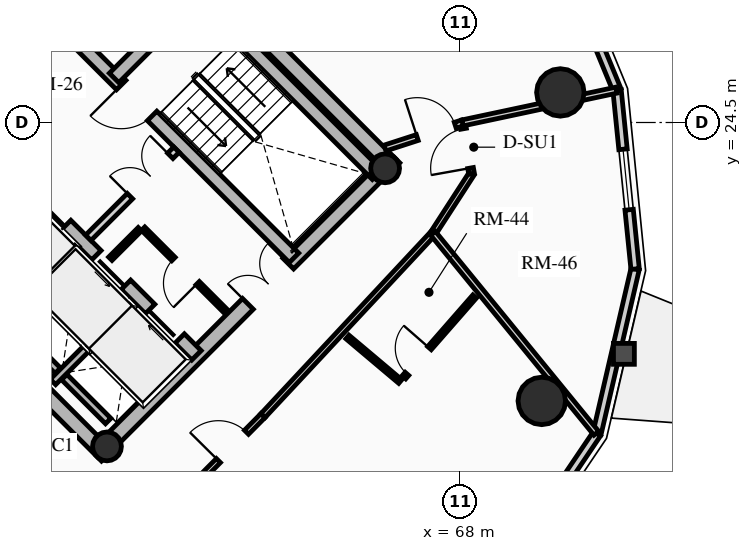
"""IFC4 building model, lengths in metres.
Left out: names, types, materials, properties, quantities, classifications, styles, units other than length and angle.
Written with IfcOpenShell. Run it as: python <this file> out.ifc"""

import sys

from ifc_helpers import new_model, si_unit, direction, frame, frame_2d, origin, origin_2d, place, context, subcontext, project, spatial, rectangle, circle, hollow_circle, extrude, source, transform, mapped, element, fill, save


model = new_model("IFC4")
c1 = context("Model", 3, precision=1e-05, world=origin(), true_north=direction((0.0, 1.0)))
c2 = subcontext(c1, "Body", "Model", "MODEL_VIEW")
j1 = project(units=[si_unit("LENGTHUNIT", "METRE"), si_unit("PLANEANGLEUNIT", "RADIAN")], contexts=[c1])
p1 = place(None, origin())
s1 = spatial("IfcSite", under=j1, at=p1, CompositionType="ELEMENT")
p2 = place(p1, origin())
s2 = spatial("IfcBuilding", under=s1, at=p2, CompositionType="ELEMENT")
p3 = place(p2, frame((0.0, 0.0, 180.7)))
s3 = spatial("IfcBuildingStorey", under=s2, at=p3, CompositionType="ELEMENT", Elevation=180.7)
for number, where, z_axis, x_axis in (
    (1, (58.702, 15.732, 0.0), (0.0, 0.0, 1.0), (-0.707, 0.707, 0.0)),
    (2, (66.268, 23.298, 0.0), (0.0, 0.0, 1.0), (-0.707, 0.707, 0.0)),
):
    element("IfcWall", number, at=place(p3, frame(where, z_axis=z_axis, x_axis=x_axis)), inside=s3, PredefinedType="SHEAR", context=c2, shape_type="SweptSolid", body=[
        extrude(rectangle(XDim=14.1, YDim=0.4, at=frame_2d((7.05, 0.0))), origin(), (0.0, 0.0, 1.0), 2.91),
    ])
p4 = place(p3, frame((58.561, 15.873, 0.0), z_axis=(0.0, 0.0, 1.0), x_axis=(0.707106781187, 0.707106781187, 0.0)))
e3 = element("IfcWall", 3, at=p4, inside=s3, PredefinedType="SHEAR", context=c2, shape_type="SweptSolid", body=[
    extrude(rectangle(XDim=10.7, YDim=0.4, at=frame_2d((5.35, 0.0))), origin(), (0.0, 0.0, 1.0), 2.91),
])
m1 = source(origin(), c2, "Body", "SweptSolid", [
    extrude(rectangle(XDim=1.5, YDim=2.02, at=frame_2d((0.75, 1.01))), frame((0.0, 0.21, 0.0), z_axis=(0.0, -1.0, 0.0), x_axis=(1.0, 0.0, 0.0)), (0.0, 0.0, 1.0), 0.42),
])
p5 = place(p4, frame((5.45, 0.0, 0.0)))
e4 = element("IfcOpeningElement", 4, at=p5, cuts=e3, PredefinedType="OPENING", context=c2, shape_type="MappedRepresentation", body=[
    mapped(m1, transform((0.0, 0.0, 0.0), x_axis=(1.0, 0.0, 0.0), y_axis=(0.0, 1.0, 0.0), z_axis=(0.0, 0.0, 1.0), scale=1.0)),
])
p6 = place(p3, frame((61.06, 18.373, 0.0), z_axis=(0.0, 0.0, 1.0), x_axis=(-0.707106781187, 0.707106781187, 0.0)))
e5 = element("IfcWall", 5, at=p6, inside=s3, PredefinedType="SHEAR", context=c2, shape_type="SweptSolid", body=[
    extrude(rectangle(XDim=13.7, YDim=0.35, at=frame_2d((6.85, 0.0))), origin(), (0.0, 0.0, 1.0), 2.91),
])
m2 = source(origin(), c2, "Body", "SweptSolid", [
    extrude(rectangle(XDim=1.1, YDim=2.015, at=frame_2d((0.55, 1.007))), frame((0.0, 0.185, 0.0), z_axis=(0.0, -1.0, 0.0), x_axis=(1.0, 0.0, 0.0)), (0.0, 0.0, 1.0), 0.37),
])
p7 = place(p6, frame((4.85, 0.0, 0.0)))
e6 = element("IfcOpeningElement", 6, at=p7, cuts=e5, PredefinedType="OPENING", context=c2, shape_type="MappedRepresentation", body=[
    mapped(m2, transform((0.0, 0.0, 0.0), x_axis=(1.0, 0.0, 0.0), y_axis=(0.0, 1.0, 0.0), z_axis=(0.0, 0.0, 1.0), scale=1.0)),
])
p8 = place(p6, frame((0.625, 0.0, 0.0)))
e7 = element("IfcOpeningElement", 7, at=p8, cuts=e5, PredefinedType="OPENING", context=c2, shape_type="MappedRepresentation", body=[
    mapped(m2, transform((0.0, 0.0, 0.0), x_axis=(1.0, 0.0, 0.0), y_axis=(0.0, 1.0, 0.0), z_axis=(0.0, 0.0, 1.0), scale=1.0)),
])
p9 = place(p6, frame((2.625, 0.0, 0.0)))
e8 = element("IfcOpeningElement", 8, at=p9, cuts=e5, PredefinedType="OPENING", context=c2, shape_type="MappedRepresentation", body=[
    mapped(m2, transform((0.0, 0.0, 0.0), x_axis=(1.0, 0.0, 0.0), y_axis=(0.0, 1.0, 0.0), z_axis=(0.0, 0.0, 1.0), scale=1.0)),
])
m3 = source(origin(), c2, "Body", "SweptSolid", [
    extrude(rectangle(XDim=1.15, YDim=2.02, at=frame_2d((0.575, 1.01))), frame((0.0, 0.185, 0.0), z_axis=(0.0, -1.0, 0.0), x_axis=(1.0, 0.0, 0.0)), (0.0, 0.0, 1.0), 0.37),
])
p10 = place(p6, frame((7.27, 0.0, 0.0)))
e9 = element("IfcOpeningElement", 9, at=p10, cuts=e5, PredefinedType="OPENING", context=c2, shape_type="MappedRepresentation", body=[
    mapped(m3, transform((0.0, 0.0, 0.0), x_axis=(1.0, 0.0, 0.0), y_axis=(0.0, 1.0, 0.0), z_axis=(0.0, 0.0, 1.0), scale=1.0)),
])
p11 = place(p3, frame((63.627, 20.94, 0.0), z_axis=(0.0, 0.0, 1.0), x_axis=(-0.707119496762, 0.707094065383, 0.0)))
e10 = element("IfcWall", 10, at=p11, inside=s3, PredefinedType="SHEAR", context=c2, shape_type="SweptSolid", body=[
    extrude(rectangle(XDim=9.6, YDim=0.35, at=frame_2d((4.8, 0.0))), origin(), (0.0, 0.0, 1.0), 2.91),
])
p12 = place(p11, frame((5.28, 0.0, 0.0)))
e11 = element("IfcOpeningElement", 11, at=p12, cuts=e10, PredefinedType="OPENING", context=c2, shape_type="MappedRepresentation", body=[
    mapped(m3, transform((0.0, 0.0, 0.0), x_axis=(1.0, 0.0, 0.0), y_axis=(0.0, 1.0, 0.0), z_axis=(0.0, 0.0, 1.0), scale=1.0)),
])
p13 = place(p3, frame((65.812, 23.125, 0.0), z_axis=(0.0, 0.0, 1.0), x_axis=(-0.707106781187, 0.707106781187, 0.0)))
e12 = element("IfcWall", 12, at=p13, inside=s3, PredefinedType="SHEAR", context=c2, shape_type="SweptSolid", body=[
    extrude(rectangle(XDim=6.695, YDim=0.35, at=frame_2d((3.348, 0.0))), origin(), (0.0, 0.0, 1.0), 2.91),
])
p14 = place(p3, frame((58.893, 25.674, 0.0), z_axis=(0.0, 0.0, 1.0), x_axis=(0.707106781187, 0.707106781187, 0.0)))
e13 = element("IfcWall", 13, at=p14, inside=s3, PredefinedType="SHEAR", context=c2, shape_type="SweptSolid", body=[
    extrude(rectangle(XDim=3.285, YDim=0.35, at=frame_2d((1.643, 0.0))), origin(), (0.0, 0.0, 1.0), 2.91),
])
for number, where, z_axis, x_axis in (
    (14, (58.706, 15.976, 0.0), (0.0, 0.0, 1.0), (0.707, 0.707, 0.0)),
    (15, (66.024, 23.294, 0.0), (0.0, 0.0, 1.0), (0.707, 0.707, 0.0)),
):
    element("IfcColumn", number, at=place(p3, frame(where, z_axis=z_axis, x_axis=x_axis)), inside=s3, PredefinedType="COLUMN", context=c2, shape_type="SweptSolid", body=[
        extrude(hollow_circle(Radius=0.38, WallThickness=0.032, at=origin_2d()), origin(), (0.0, 0.0, 1.0), 2.91),
    ])
for number, where, z_axis, x_axis in (
    (16, (70.146, 17.173, 0.0), (0.0, 0.0, 1.0), (1.0, 0.0, 0.0)),
    (17, (70.635, 25.291, 0.0), (0.0, 0.0, 1.0), (1.0, 0.0, 0.0)),
):
    element("IfcColumn", number, at=place(p3, frame(where, z_axis=z_axis, x_axis=x_axis)), inside=s3, PredefinedType="USERDEFINED", context=c2, shape_type="SweptSolid", body=[
        extrude(circle(Radius=0.625, at=origin_2d()), origin(), (0.0, 0.0, 1.0), 2.91),
    ])
p15 = place(p3, frame((71.6, 16.313, 0.0), z_axis=(0.0, 0.0, 1.0), x_axis=(-0.55951912514, -0.828817439852, 0.0)))
e18 = element("IfcWall", 18, at=p15, inside=s3, PredefinedType="SOLIDWALL", context=c2, shape_type="SweptSolid", body=[
    extrude(rectangle(XDim=4.259, YDim=0.22, at=frame_2d((2.129, 0.0))), origin(), (0.0, 0.0, 1.0), 2.245),
])
m4 = source(origin(), c2, "Body", "SweptSolid", [
    extrude(rectangle(XDim=1.6, YDim=1.3, at=frame_2d((0.8, 0.65))), frame((0.0, 0.12, 0.0), z_axis=(0.0, -1.0, 0.0), x_axis=(1.0, 0.0, 0.0)), (0.0, 0.0, 1.0), 0.24),
])
p16 = place(p15, frame((1.33, 0.0, 0.65)))
e19 = element("IfcOpeningElement", 19, at=p16, cuts=e18, PredefinedType="OPENING", context=c2, shape_type="MappedRepresentation", body=[
    mapped(m4, transform((0.0, 0.0, 0.0), x_axis=(1.0, 0.0, 0.0), y_axis=(0.0, 1.0, 0.0), z_axis=(0.0, 0.0, 1.0), scale=1.0)),
])
p17 = place(p3, frame((72.603, 20.645, 0.0), z_axis=(0.0, 0.0, 1.0), x_axis=(-0.22557328587, -0.97422620202, 0.0)))
e20 = element("IfcWall", 20, at=p17, inside=s3, PredefinedType="SOLIDWALL", context=c2, shape_type="SweptSolid", body=[
    extrude(rectangle(XDim=4.446, YDim=0.22, at=frame_2d((2.223, 0.0))), origin(), (0.0, 0.0, 1.0), 2.245),
])
p18 = place(p3, frame((72.127, 25.354, 0.0), z_axis=(0.0, 0.0, 1.0), x_axis=(0.100438356004, -0.994943283129, 0.0)))
e21 = element("IfcWall", 21, at=p18, inside=s3, PredefinedType="SOLIDWALL", context=c2, shape_type="SweptSolid", body=[
    extrude(rectangle(XDim=4.733, YDim=0.22, at=frame_2d((2.366, 0.0))), origin(), (0.0, 0.0, 1.0), 2.245),
])
p19 = place(p18, frame((1.566, 0.0, 0.65)))
e22 = element("IfcOpeningElement", 22, at=p19, cuts=e21, PredefinedType="OPENING", context=c2, shape_type="MappedRepresentation", body=[
    mapped(m4, transform((0.0, 0.0, 0.0), x_axis=(1.0, 0.0, 0.0), y_axis=(0.0, 1.0, 0.0), z_axis=(0.0, 0.0, 1.0), scale=1.0)),
])
p20 = place(p3, frame((70.22, 29.979, 0.0), z_axis=(0.0, 0.0, 1.0), x_axis=(0.381196434348, -0.924494066201, 0.0)))
e23 = element("IfcWall", 23, at=p20, inside=s3, PredefinedType="SOLIDWALL", context=c2, shape_type="SweptSolid", body=[
    extrude(rectangle(XDim=5.003, YDim=0.22, at=frame_2d((2.501, 0.0))), origin(), (0.0, 0.0, 1.0), 2.245),
])
p21 = place(p3, frame((55.888, 19.069, 0.0), z_axis=(0.0, 0.0, 1.0), x_axis=(0.707106781187, 0.707106781187, 0.0)))
e24 = element("IfcWall", 24, at=p21, inside=s3, PredefinedType="SHEAR", context=c2, shape_type="SweptSolid", body=[
    extrude(rectangle(XDim=2.97, YDim=0.2, at=frame_2d((1.485, 0.0))), origin(), (0.0, 0.0, 1.0), 2.91),
])
p22 = place(p3, frame((57.284, 17.673, 0.0), z_axis=(0.0, 0.0, 1.0), x_axis=(0.707147878904, 0.70706568108, 0.0)))
e25 = element("IfcWall", 25, at=p22, inside=s3, PredefinedType="SHEAR", context=c2, shape_type="SweptSolid", body=[
    extrude(rectangle(XDim=2.97, YDim=0.2, at=frame_2d((1.485, 0.0))), origin(), (0.0, 0.0, 1.0), 2.91),
])
p23 = place(p3, frame((57.412, 17.97, 0.0), z_axis=(0.0, 0.0, 1.0), x_axis=(-0.707106781187, 0.707106781187, 0.0)))
e26 = element("IfcWall", 26, at=p23, inside=s3, PredefinedType="SHEAR", context=c2, shape_type="SweptSolid", body=[
    extrude(rectangle(XDim=1.735, YDim=0.2, at=frame_2d((0.867, 0.0))), origin(), (0.0, 0.0, 1.0), 2.91),
])
p24 = place(p3, frame((58.737, 16.644, 0.0), z_axis=(0.0, 0.0, 1.0), x_axis=(-0.707032117043, 0.707181437447, 0.0)))
e27 = element("IfcWall", 27, at=p24, inside=s3, PredefinedType="SHEAR", context=c2, shape_type="SweptSolid", body=[
    extrude(rectangle(XDim=1.635, YDim=0.2, at=frame_2d((0.817, 0.0))), origin(), (0.0, 0.0, 1.0), 2.91),
])
p25 = place(p3, frame((58.214, 21.467, 0.0), z_axis=(0.0, 0.0, 1.0), x_axis=(0.707106781187, 0.707106781187, 0.0)))
e28 = element("IfcWall", 28, at=p25, inside=s3, PredefinedType="PARTITIONING", context=c2, shape_type="SweptSolid", body=[
    extrude(rectangle(XDim=3.28, YDim=0.2, at=frame_2d((1.64, 0.0))), origin(), (0.0, 0.0, 1.0), 2.675),
])
m5 = source(origin(), c2, "Body", "SweptSolid", [
    extrude(rectangle(XDim=1.5, YDim=2.02, at=frame_2d((0.75, 1.01))), frame((0.0, 0.11, 0.0), z_axis=(0.0, -1.0, 0.0), x_axis=(1.0, 0.0, 0.0)), (0.0, 0.0, 1.0), 0.22),
])
p26 = place(p25, frame((1.55, 0.0, 0.0)))
e29 = element("IfcOpeningElement", 29, at=p26, cuts=e28, PredefinedType="OPENING", context=c2, shape_type="MappedRepresentation", body=[
    mapped(m5, transform((0.0, 0.0, 0.0), x_axis=(1.0, 0.0, 0.0), y_axis=(0.0, 1.0, 0.0), z_axis=(0.0, 0.0, 1.0), scale=1.0)),
])
p27 = place(p3, frame((54.961, 24.719, 0.0), z_axis=(0.0, 0.0, 1.0), x_axis=(0.707106781187, 0.707106781187, 0.0)))
e30 = element("IfcWall", 30, at=p27, inside=s3, PredefinedType="PARTITIONING", context=c2, shape_type="SweptSolid", body=[
    extrude(rectangle(XDim=3.28, YDim=0.2, at=frame_2d((1.64, 0.0))), origin(), (0.0, 0.0, 1.0), 2.675),
])
m6 = source(origin(), c2, "Body", "SweptSolid", [
    extrude(rectangle(XDim=0.9, YDim=2.005, at=frame_2d((0.45, 1.002))), frame((0.0, 0.11, 0.0), z_axis=(0.0, -1.0, 0.0), x_axis=(1.0, 0.0, 0.0)), (0.0, 0.0, 1.0), 0.22),
])
p28 = place(p27, frame((0.16, 0.0, 0.0)))
e31 = element("IfcOpeningElement", 31, at=p28, cuts=e30, PredefinedType="OPENING", context=c2, shape_type="MappedRepresentation", body=[
    mapped(m6, transform((0.0, 0.0, 0.0), x_axis=(1.0, 0.0, 0.0), y_axis=(0.0, 1.0, 0.0), z_axis=(0.0, 0.0, 1.0), scale=1.0)),
])
p29 = place(p3, frame((61.835, 19.529, 0.0), z_axis=(0.0, 0.0, 1.0), x_axis=(-0.707146413884, 0.707067146267, 0.0)))
e32 = element("IfcWall", 32, at=p29, inside=s3, PredefinedType="PARTITIONING", context=c2, shape_type="SweptSolid", body=[
    extrude(rectangle(XDim=3.08, YDim=0.125, at=frame_2d((1.54, 0.0))), origin(), (0.0, 0.0, 1.0), 2.675),
])
m7 = source(origin(), c2, "Body", "SweptSolid", [
    extrude(rectangle(XDim=0.9, YDim=2.005, at=frame_2d((0.45, 1.002))), frame((0.0, 0.073, 0.0), z_axis=(0.0, -1.0, 0.0), x_axis=(1.0, 0.0, 0.0)), (0.0, 0.0, 1.0), 0.145),
])
p30 = place(p29, frame((1.05, 0.0, 0.0)))
e33 = element("IfcOpeningElement", 33, at=p30, cuts=e32, PredefinedType="OPENING", context=c2, shape_type="MappedRepresentation", body=[
    mapped(m7, transform((0.0, 0.0, 0.0), x_axis=(1.0, 0.0, 0.0), y_axis=(0.0, 1.0, 0.0), z_axis=(0.0, 0.0, 1.0), scale=1.0)),
])
p31 = place(p3, frame((58.794, 20.915, 0.0), z_axis=(0.0, 0.0, 1.0), x_axis=(0.707106781187, 0.707106781187, 0.0)))
e34 = element("IfcWall", 34, at=p31, inside=s3, PredefinedType="PARTITIONING", context=c2, shape_type="SweptSolid", body=[
    extrude(rectangle(XDim=1.1, YDim=0.125, at=frame_2d((0.55, 0.0))), origin(), (0.0, 0.0, 1.0), 2.675),
])
p32 = place(p3, frame((60.501, 14.457, 0.0), z_axis=(0.0, 0.0, 1.0), x_axis=(0.704012266258, 0.710187812454, 0.0)))
e35 = element("IfcWall", 35, at=p32, inside=s3, PredefinedType="PARTITIONING", context=c2, shape_type="SweptSolid", body=[
    extrude(rectangle(XDim=3.281, YDim=0.15, at=frame_2d((1.641, 0.0))), origin(), (0.0, 0.0, 1.0), 2.245),
])
m8 = source(origin(), c2, "Body", "SweptSolid", [
    extrude(rectangle(XDim=1.05, YDim=2.015, at=frame_2d((0.525, 1.007))), frame((0.0, 0.085, 0.0), z_axis=(0.0, -1.0, 0.0), x_axis=(1.0, 0.0, 0.0)), (0.0, 0.0, 1.0), 0.17),
])
p33 = place(p32, frame((1.614, 0.0, 0.0)))
e36 = element("IfcOpeningElement", 36, at=p33, cuts=e35, PredefinedType="OPENING", context=c2, shape_type="MappedRepresentation", body=[
    mapped(m8, transform((0.0, 0.0, 0.0), x_axis=(1.0, 0.0, 0.0), y_axis=(0.0, 1.0, 0.0), z_axis=(0.0, 0.0, 1.0), scale=1.0)),
])
p34 = place(p3, frame((62.812, 16.788, 0.0), z_axis=(0.0, 0.0, 1.0), x_axis=(0.682323555485, 0.731050316757, 0.0)))
e37 = element("IfcWall", 37, at=p34, inside=s3, PredefinedType="PARTITIONING", context=c2, shape_type="SweptSolid", body=[
    extrude(rectangle(XDim=6.559, YDim=0.15, at=frame_2d((3.279, 0.0))), origin(), (0.0, 0.0, 1.0), 2.245),
])
p35 = place(p3, frame((67.287, 21.582, 0.0), z_axis=(0.0, 0.0, 1.0), x_axis=(0.543202443884, 0.839601753785, 0.0)))
e38 = element("IfcWall", 38, at=p35, inside=s3, PredefinedType="PARTITIONING", context=c2, shape_type="SweptSolid", body=[
    extrude(rectangle(XDim=1.866, YDim=0.15, at=frame_2d((0.933, 0.0))), origin(), (0.0, 0.0, 1.0), 2.245),
])
p36 = place(p3, frame((68.3, 23.149, 0.0), z_axis=(0.0, 0.0, 1.0), x_axis=(-0.176423554694, 0.984314344785, 0.0)))
e39 = element("IfcWall", 39, at=p36, inside=s3, PredefinedType="PARTITIONING", context=c2, shape_type="SweptSolid", body=[
    extrude(rectangle(XDim=1.362, YDim=0.15, at=frame_2d((0.681, 0.0))), origin(), (0.0, 0.0, 1.0), 2.245),
])
p37 = place(p36, frame((0.156, 0.0, 0.0)))
e40 = element("IfcOpeningElement", 40, at=p37, cuts=e39, PredefinedType="OPENING", context=c2, shape_type="MappedRepresentation", body=[
    mapped(m8, transform((0.0, 0.0, 0.0), x_axis=(1.0, 0.0, 0.0), y_axis=(0.0, 1.0, 0.0), z_axis=(0.0, 0.0, 1.0), scale=1.0)),
])
p38 = place(p3, frame((67.287, 21.582, 0.0), z_axis=(0.0, 0.0, 1.0), x_axis=(0.632528819581, -0.774536824431, 0.0)))
e41 = element("IfcWall", 41, at=p38, inside=s3, PredefinedType="PARTITIONING", context=c2, shape_type="SweptSolid", body=[
    extrude(rectangle(XDim=6.791, YDim=0.16, at=frame_2d((3.396, 0.0))), origin(), (0.0, 0.0, 1.0), 2.245),
])
p39 = place(p3, frame((68.06, 24.489, 0.0), z_axis=(0.0, 0.0, 1.0), x_axis=(0.978089830324, 0.2081832938, 0.0)))
e42 = element("IfcWall", 42, at=p39, inside=s3, PredefinedType="PARTITIONING", context=c2, shape_type="SweptSolid", body=[
    extrude(rectangle(XDim=4.138, YDim=0.16, at=frame_2d((2.069, 0.0))), origin(), (0.0, 0.0, 1.0), 2.245),
])
p40 = place(p3, frame((66.021, 23.828, 0.0), z_axis=(0.0, 0.0, 1.0), x_axis=(0.951292345965, 0.308290240695, 0.0)))
e43 = element("IfcWall", 43, at=p40, inside=s3, PredefinedType="PARTITIONING", context=c2, shape_type="SweptSolid", body=[
    extrude(rectangle(XDim=2.144, YDim=0.16, at=frame_2d((1.072, 0.0))), origin(), (0.0, 0.0, 1.0), 2.245),
])
m9 = source(origin(), c2, "Body", "SweptSolid", [
    extrude(rectangle(XDim=1.05, YDim=2.015, at=frame_2d((0.525, 1.007))), frame((0.0, 0.09, 0.0), z_axis=(0.0, -1.0, 0.0), x_axis=(1.0, 0.0, 0.0)), (0.0, 0.0, 1.0), 0.18),
])
p41 = place(p40, frame((0.894, 0.0, 0.0)))
e44 = element("IfcOpeningElement", 44, at=p41, cuts=e43, PredefinedType="OPENING", context=c2, shape_type="MappedRepresentation", body=[
    mapped(m9, transform((0.0, 0.0, 0.0), x_axis=(1.0, 0.0, 0.0), y_axis=(0.0, 1.0, 0.0), z_axis=(0.0, 0.0, 1.0), scale=1.0)),
])
p42 = place(p3, frame((65.033, 18.856, 0.0), z_axis=(0.0, 0.0, 1.0), x_axis=(0.764632588969, -0.644466449, 0.0)))
e45 = element("IfcWall", 45, at=p42, inside=s3, PredefinedType="PARTITIONING", context=c2, shape_type="SweptSolid", body=[
    extrude(rectangle(XDim=1.818, YDim=0.125, at=frame_2d((0.909, 0.0))), origin(), (0.0, 0.0, 1.0), 2.675),
])
p43 = place(p3, frame((66.52, 17.795, 0.0), z_axis=(0.0, 0.0, 1.0), x_axis=(0.658266024679, 0.752785388244, 0.0)))
e46 = element("IfcWall", 46, at=p43, inside=s3, PredefinedType="PARTITIONING", context=c2, shape_type="SweptSolid", body=[
    extrude(rectangle(XDim=2.826, YDim=0.125, at=frame_2d((1.413, 0.0))), origin(), (0.0, 0.0, 1.0), 2.245),
])
p44 = place(p43, frame((0.12, 0.0, 0.0)))
e47 = element("IfcOpeningElement", 47, at=p44, cuts=e46, PredefinedType="OPENING", context=c2, shape_type="MappedRepresentation", body=[
    mapped(m7, transform((0.0, 0.0, 0.0), x_axis=(1.0, 0.0, 0.0), y_axis=(0.0, 1.0, 0.0), z_axis=(0.0, 0.0, 1.0), scale=1.0)),
])
m10 = source(origin(), c2, "Body", "SweptSolid", [
    extrude(rectangle(XDim=1.6, YDim=1.3, at=frame_2d((0.8, 0.65))), frame((0.0, 0.03, 0.0), z_axis=(0.0, -1.0, 0.0), x_axis=(1.0, 0.0, 0.0)), (0.0, 0.0, 1.0), 0.06),
])
p45 = place(p19, origin())
e48 = element("IfcWindow", 48, at=p45, inside=s3, PartitioningType="SINGLE_PANEL", PredefinedType="WINDOW", context=c2, shape_type="MappedRepresentation", body=[
    mapped(m10, transform((0.0, 0.0, 0.0), x_axis=(1.0, 0.0, 0.0), y_axis=(0.0, 1.0, 0.0), z_axis=(0.0, 0.0, 1.0), scale=1.0)),
])
fill(e22, e48)
m11 = source(origin(), c2, "Body", "SweptSolid", [
    extrude(rectangle(XDim=1.1, YDim=2.015, at=frame_2d((0.55, 1.007))), frame((0.0, 0.025, 0.0), z_axis=(0.0, -1.0, 0.0), x_axis=(1.0, 0.0, 0.0)), (0.0, 0.0, 1.0), 0.05),
])
p46 = place(p7, origin())
e49 = element("IfcDoor", 49, at=p46, inside=s3, OperationType="SLIDING_TO_LEFT", PredefinedType="DOOR", context=c2, shape_type="MappedRepresentation", body=[
    mapped(m11, transform((0.0, 0.0, 0.0), x_axis=(1.0, 0.0, 0.0), y_axis=(0.0, 1.0, 0.0), z_axis=(0.0, 0.0, 1.0), scale=1.0)),
])
fill(e6, e49)
p47 = place(p8, origin())
e50 = element("IfcDoor", 50, at=p47, inside=s3, OperationType="SLIDING_TO_RIGHT", PredefinedType="DOOR", context=c2, shape_type="MappedRepresentation", body=[
    mapped(m11, transform((0.0, 0.0, 0.0), x_axis=(1.0, 0.0, 0.0), y_axis=(0.0, 1.0, 0.0), z_axis=(0.0, 0.0, 1.0), scale=1.0)),
])
fill(e7, e50)
p48 = place(p9, origin())
e51 = element("IfcDoor", 51, at=p48, inside=s3, OperationType="SLIDING_TO_LEFT", PredefinedType="DOOR", context=c2, shape_type="MappedRepresentation", body=[
    mapped(m11, transform((0.0, 0.0, 0.0), x_axis=(1.0, 0.0, 0.0), y_axis=(0.0, 1.0, 0.0), z_axis=(0.0, 0.0, 1.0), scale=1.0)),
])
fill(e8, e51)
m12 = source(origin(), c2, "Body", "SweptSolid", [
    extrude(rectangle(XDim=1.15, YDim=2.02, at=frame_2d((0.575, 1.01))), frame((0.0, 0.025, 0.0), z_axis=(0.0, -1.0, 0.0), x_axis=(1.0, 0.0, 0.0)), (0.0, 0.0, 1.0), 0.05),
])
p49 = place(p12, origin())
e52 = element("IfcDoor", 52, at=p49, inside=s3, OperationType="SINGLE_SWING_RIGHT", PredefinedType="DOOR", context=c2, shape_type="MappedRepresentation", body=[
    mapped(m12, transform((0.0, 0.0, 0.0), x_axis=(1.0, 0.0, 0.0), y_axis=(0.0, 1.0, 0.0), z_axis=(0.0, 0.0, 1.0), scale=1.0)),
])
fill(e11, e52)
m13 = source(origin(), c2, "Body", "SweptSolid", [
    extrude(rectangle(XDim=1.5, YDim=2.02, at=frame_2d((0.75, 1.01))), frame((0.0, 0.025, 0.0), z_axis=(0.0, -1.0, 0.0), x_axis=(1.0, 0.0, 0.0)), (0.0, 0.0, 1.0), 0.05),
])
p50 = place(p5, origin())
e53 = element("IfcDoor", 53, at=p50, inside=s3, OperationType="DOUBLE_DOOR_SINGLE_SWING", PredefinedType="DOOR", context=c2, shape_type="MappedRepresentation", body=[
    mapped(m13, transform((0.0, 0.0, 0.0), x_axis=(1.0, 0.0, 0.0), y_axis=(0.0, 1.0, 0.0), z_axis=(0.0, 0.0, 1.0), scale=1.0)),
])
fill(e4, e53)
p51 = place(p26, origin())
e54 = element("IfcDoor", 54, at=p51, inside=s3, OperationType="DOUBLE_DOOR_SINGLE_SWING", PredefinedType="DOOR", context=c2, shape_type="MappedRepresentation", body=[
    mapped(m13, transform((0.0, 0.0, 0.0), x_axis=(1.0, 0.0, 0.0), y_axis=(0.0, 1.0, 0.0), z_axis=(0.0, 0.0, 1.0), scale=1.0)),
])
fill(e29, e54)
m14 = source(origin(), c2, "Body", "SweptSolid", [
    extrude(rectangle(XDim=0.9, YDim=2.005, at=frame_2d((0.45, 1.002))), frame((0.0, 0.025, 0.0), z_axis=(0.0, -1.0, 0.0), x_axis=(1.0, 0.0, 0.0)), (0.0, 0.0, 1.0), 0.05),
])
p52 = place(p30, origin())
e55 = element("IfcDoor", 55, at=p52, inside=s3, OperationType="SINGLE_SWING_LEFT", PredefinedType="DOOR", context=c2, shape_type="MappedRepresentation", body=[
    mapped(m14, transform((0.0, 0.0, 0.0), x_axis=(1.0, 0.0, 0.0), y_axis=(0.0, 1.0, 0.0), z_axis=(0.0, 0.0, 1.0), scale=1.0)),
])
fill(e33, e55)
m15 = source(origin(), c2, "Body", "SweptSolid", [
    extrude(rectangle(XDim=1.05, YDim=2.015, at=frame_2d((0.525, 1.007))), frame((0.0, 0.025, 0.0), z_axis=(0.0, -1.0, 0.0), x_axis=(1.0, 0.0, 0.0)), (0.0, 0.0, 1.0), 0.05),
])
p53 = place(p41, origin())
e56 = element("IfcDoor", 56, at=p53, inside=s3, OperationType="SINGLE_SWING_LEFT", PredefinedType="DOOR", context=c2, shape_type="MappedRepresentation", body=[
    mapped(m15, transform((0.0, 0.0, 0.0), x_axis=(1.0, 0.0, 0.0), y_axis=(0.0, 1.0, 0.0), z_axis=(0.0, 0.0, 1.0), scale=1.0)),
])
fill(e44, e56)
p54 = place(p33, origin())
e57 = element("IfcDoor", 57, at=p54, inside=s3, OperationType="SINGLE_SWING_LEFT", PredefinedType="DOOR", context=c2, shape_type="MappedRepresentation", body=[
    mapped(m15, transform((0.0, 0.0, 0.0), x_axis=(1.0, 0.0, 0.0), y_axis=(0.0, 1.0, 0.0), z_axis=(0.0, 0.0, 1.0), scale=1.0)),
])
fill(e36, e57)
p55 = place(p44, origin())
e58 = element("IfcDoor", 58, at=p55, inside=s3, OperationType="SINGLE_SWING_RIGHT", PredefinedType="DOOR", context=c2, shape_type="MappedRepresentation", body=[
    mapped(m14, transform((0.0, 0.0, 0.0), x_axis=(1.0, 0.0, 0.0), y_axis=(0.0, 1.0, 0.0), z_axis=(0.0, 0.0, 1.0), scale=1.0)),
])
fill(e47, e58)
p56 = place(p37, origin())
e59 = element("IfcDoor", 59, at=p56, inside=s3, OperationType="SINGLE_SWING_LEFT", PredefinedType="DOOR", context=c2, shape_type="MappedRepresentation", body=[
    mapped(m15, transform((0.0, 0.0, 0.0), x_axis=(1.0, 0.0, 0.0), y_axis=(0.0, 1.0, 0.0), z_axis=(0.0, 0.0, 1.0), scale=1.0)),
])
fill(e40, e59)
save(model, sys.argv[1])
